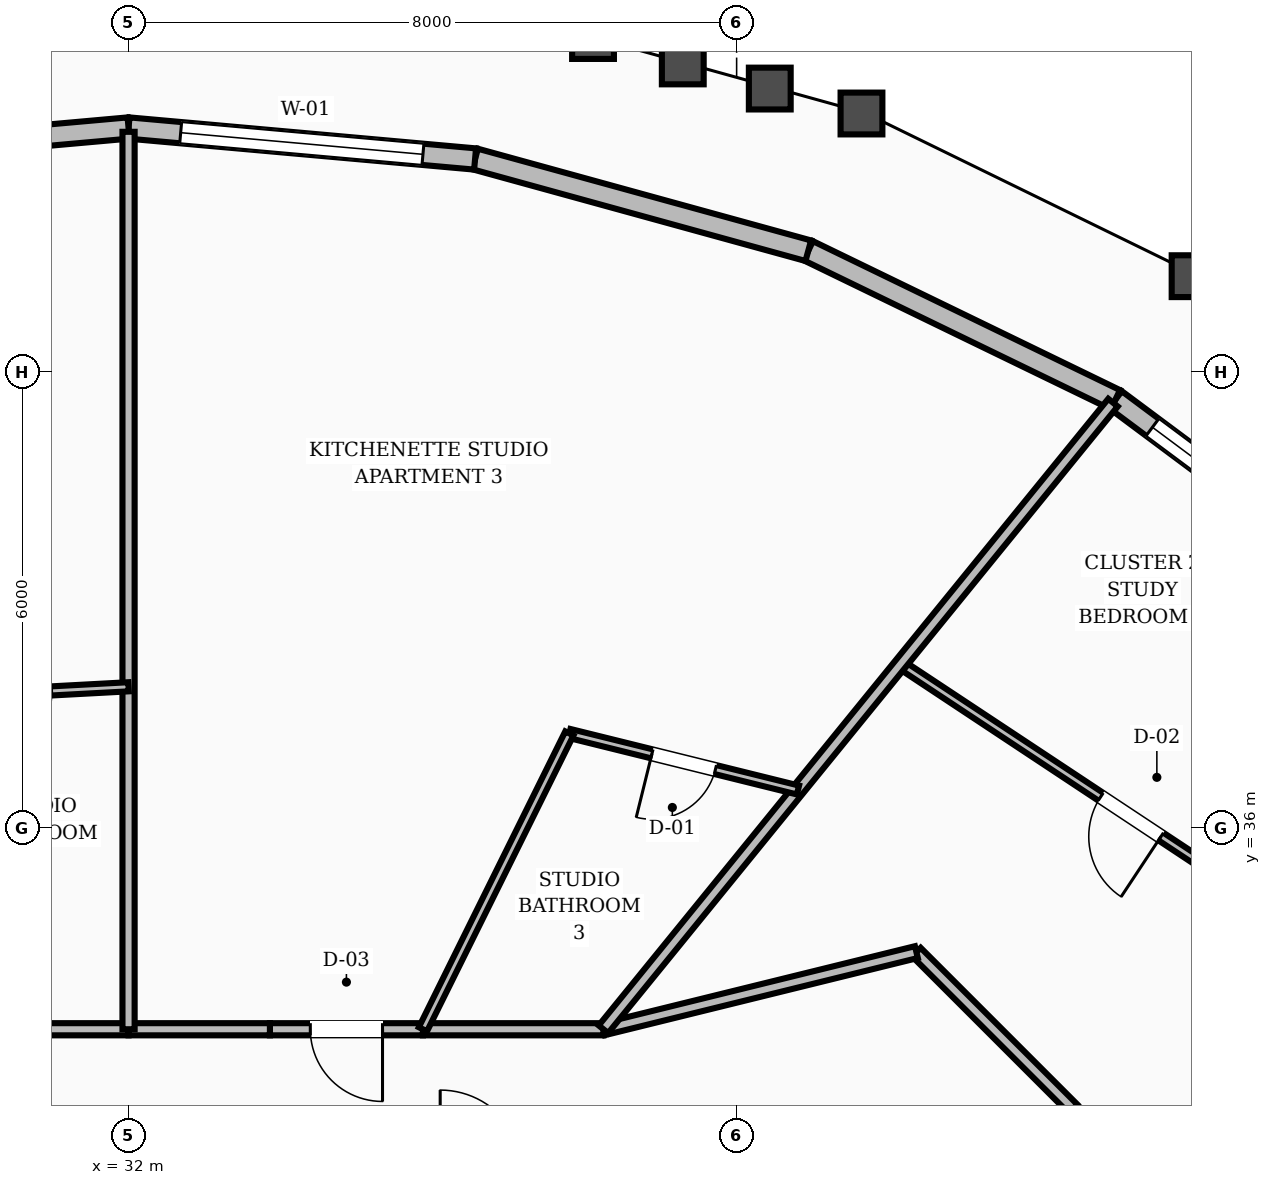
"""IFC4 building model, lengths in metres.
Left out: names, types, materials, properties, quantities, classifications, styles, units other than length and angle.
Written with IfcOpenShell. Run it as: python <this file> out.ifc"""

import sys

from ifc_helpers import new_model, si_unit, direction, frame, frame_2d, origin, place, context, subcontext, project, spatial, rectangle, extrude, element, fill, save


model = new_model("IFC4")
c1 = context("Model", 3, precision=1e-05, world=origin(), true_north=direction((0.0, 1.0)))
c2 = subcontext(c1, "Body", "Model", "MODEL_VIEW")
j1 = project(units=[si_unit("LENGTHUNIT", "METRE"), si_unit("PLANEANGLEUNIT", "RADIAN")], contexts=[c1])
p1 = place(None, origin())
s1 = spatial("IfcSite", under=j1, at=p1, CompositionType="ELEMENT")
p2 = place(p1, origin())
s2 = spatial("IfcBuilding", under=s1, at=p2, CompositionType="ELEMENT")
p3 = place(p2, frame((0.0, 0.0, 218.4)))
s3 = spatial("IfcBuildingStorey", under=s2, at=p3, CompositionType="ELEMENT", Elevation=218.4)
p4 = place(p3, frame((48.524, 38.995, 0.0), z_axis=(0.0, 0.0, 1.0), x_axis=(-0.802005914902, 0.597316090912, 0.0)))
e1 = element("IfcWall", 1, at=p4, inside=s3, PredefinedType="STANDARD", context=c2, shape_type="SweptSolid", body=[
    extrude(rectangle(XDim=4.416, YDim=0.28, at=frame_2d((2.208, 0.0))), origin(), (0.0, 0.0, 1.0), 2.88),
])
p5 = place(p4, frame((0.608, 0.0, 0.8)))
e2 = element("IfcOpeningElement", 2, at=p5, cuts=e1, PredefinedType="OPENING", context=c2, shape_type="SweptSolid", body=[
    extrude(rectangle(XDim=3.2, YDim=1.65, at=frame_2d((1.6, 0.825))), frame((0.0, 0.15, 0.0), z_axis=(0.0, -1.0, 0.0), x_axis=(1.0, 0.0, 0.0)), (0.0, 0.0, 1.0), 0.3),
])
p6 = place(p3, frame((44.983, 41.633, 0.0), z_axis=(0.0, 0.0, 1.0), x_axis=(-0.899755886265, 0.436393566785, 0.0)))
e3 = element("IfcWall", 3, at=p6, inside=s3, PredefinedType="STANDARD", context=c2, shape_type="SweptSolid", body=[
    extrude(rectangle(XDim=4.49, YDim=0.28, at=frame_2d((2.245, 0.0))), origin(), (0.0, 0.0, 1.0), 2.88),
])
p7 = place(p3, frame((40.943, 43.592, 0.0), z_axis=(0.0, 0.0, 1.0), x_axis=(-0.964121606476, 0.265460972511, 0.0)))
e4 = element("IfcWall", 4, at=p7, inside=s3, PredefinedType="STANDARD", context=c2, shape_type="SweptSolid", body=[
    extrude(rectangle(XDim=4.547, YDim=0.28, at=frame_2d((2.273, 0.0))), origin(), (0.0, 0.0, 1.0), 2.88),
])
p8 = place(p3, frame((36.559, 44.799, 0.0), z_axis=(0.0, 0.0, 1.0), x_axis=(-0.996029770712, 0.089020760807, 0.0)))
e5 = element("IfcWall", 5, at=p8, inside=s3, PredefinedType="STANDARD", context=c2, shape_type="SweptSolid", body=[
    extrude(rectangle(XDim=4.577, YDim=0.28, at=frame_2d((2.289, 0.0))), origin(), (0.0, 0.0, 1.0), 2.88),
])
p9 = place(p8, frame((0.689, 0.0, 0.8)))
e6 = element("IfcOpeningElement", 6, at=p9, cuts=e5, PredefinedType="OPENING", context=c2, shape_type="SweptSolid", body=[
    extrude(rectangle(XDim=3.2, YDim=1.65, at=frame_2d((1.6, 0.825))), frame((0.0, 0.15, 0.0), z_axis=(0.0, -1.0, 0.0), x_axis=(1.0, 0.0, 0.0)), (0.0, 0.0, 1.0), 0.3),
])
p10 = place(p3, frame((32.0, 45.207, 0.0), z_axis=(0.0, 0.0, 1.0), x_axis=(-0.996029770712, -0.089020760807, 0.0)))
e7 = element("IfcWall", 7, at=p10, inside=s3, PredefinedType="STANDARD", context=c2, shape_type="SweptSolid", body=[
    extrude(rectangle(XDim=4.577, YDim=0.28, at=frame_2d((2.289, 0.0))), origin(), (0.0, 0.0, 1.0), 2.88),
])
p11 = place(p3, frame((44.427, 32.303, 0.0), z_axis=(0.0, 0.0, 1.0), x_axis=(-0.707106781187, 0.707106781187, 0.0)))
e8 = element("IfcWall", 8, at=p11, inside=s3, PredefinedType="SOLIDWALL", context=c2, shape_type="SweptSolid", body=[
    extrude(rectangle(XDim=2.916, YDim=0.16, at=frame_2d((1.458, 0.0))), origin(), (0.0, 0.0, 1.0), 2.87),
])
p12 = place(p3, frame((42.365, 34.365, 0.0), z_axis=(0.0, 0.0, 1.0), x_axis=(-0.970939799552, -0.239323850978, 0.0)))
e9 = element("IfcWall", 9, at=p12, inside=s3, PredefinedType="SOLIDWALL", context=c2, shape_type="SweptSolid", body=[
    extrude(rectangle(XDim=4.241, YDim=0.16, at=frame_2d((2.12, 0.0))), origin(), (0.0, 0.0, 1.0), 2.87),
])
p13 = place(p3, frame((38.248, 33.35, 0.0), z_axis=(0.0, 0.0, 1.0), x_axis=(-1.0, 0.0, 0.0)))
e10 = element("IfcWall", 10, at=p13, inside=s3, PredefinedType="SOLIDWALL", context=c2, shape_type="SweptSolid", body=[
    extrude(rectangle(XDim=2.375, YDim=0.16, at=frame_2d((1.188, 0.0))), origin(), (0.0, 0.0, 1.0), 2.87),
])
p14 = place(p3, frame((35.873, 33.35, 0.0), z_axis=(0.0, 0.0, 1.0), x_axis=(-1.0, 0.0, 0.0)))
e11 = element("IfcWall", 11, at=p14, inside=s3, PredefinedType="SOLIDWALL", context=c2, shape_type="SweptSolid", body=[
    extrude(rectangle(XDim=2.013, YDim=0.16, at=frame_2d((1.006, 0.0))), origin(), (0.0, 0.0, 1.0), 2.87),
])
p15 = place(p14, frame((0.531, 0.0, 0.0)))
e12 = element("IfcOpeningElement", 12, at=p15, cuts=e11, PredefinedType="OPENING", context=c2, shape_type="SweptSolid", body=[
    extrude(rectangle(XDim=0.95, YDim=2.1, at=frame_2d((0.475, 1.05))), frame((0.0, 0.09, 0.0), z_axis=(0.0, -1.0, 0.0), x_axis=(1.0, 0.0, 0.0)), (0.0, 0.0, 1.0), 0.18),
])
for number, where, z_axis, x_axis in (
    (13, (33.86, 33.35, 0.0), (0.0, 0.0, 1.0), (-1.0, 0.0, 0.0)),
    (14, (32.0, 33.35, 0.0), (0.0, 0.0, 1.0), (-1.0, 0.0, 0.0)),
):
    element("IfcWall", number, at=place(p3, frame(where, z_axis=z_axis, x_axis=x_axis)), inside=s3, PredefinedType="SOLIDWALL", context=c2, shape_type="SweptSolid", body=[
        extrude(rectangle(XDim=1.86, YDim=0.16, at=frame_2d((0.93, 0.0))), origin(), (0.0, 0.0, 1.0), 2.87),
    ])
p16 = place(p3, frame((48.219, 34.14, 0.0), z_axis=(0.0, 0.0, 1.0), x_axis=(-0.833915165303, 0.551892649957, 0.0)))
e15 = element("IfcWall", 15, at=p16, inside=s3, PredefinedType="PARTITIONING", context=c2, shape_type="SweptSolid", body=[
    extrude(rectangle(XDim=7.272, YDim=0.12, at=frame_2d((3.636, 0.0))), origin(), (0.0, 0.0, 1.0), 2.87),
])
p17 = place(p16, frame((3.161, 0.0, 0.0)))
e16 = element("IfcOpeningElement", 16, at=p17, cuts=e15, PredefinedType="OPENING", context=c2, shape_type="SweptSolid", body=[
    extrude(rectangle(XDim=0.95, YDim=2.1, at=frame_2d((0.475, 1.05))), frame((0.0, 0.07, 0.0), z_axis=(0.0, -1.0, 0.0), x_axis=(1.0, 0.0, 0.0)), (0.0, 0.0, 1.0), 0.14),
])
p18 = place(p3, frame((38.248, 33.35, 0.0), z_axis=(0.0, 0.0, 1.0), x_axis=(0.630915216518, 0.775851783246, 0.0)))
e17 = element("IfcWall", 17, at=p18, inside=s3, PredefinedType="SOLIDWALL", context=c2, shape_type="SweptSolid", body=[
    extrude(rectangle(XDim=10.625, YDim=0.16, at=frame_2d((5.313, 0.0))), origin(), (0.0, 0.0, 1.0), 2.87),
])
p19 = place(p3, frame((40.807, 36.497, 0.0), z_axis=(0.0, 0.0, 1.0), x_axis=(-0.970668626589, 0.240421332986, 0.0)))
e18 = element("IfcWall", 18, at=p19, inside=s3, PredefinedType="PARTITIONING", context=c2, shape_type="SweptSolid", body=[
    extrude(rectangle(XDim=3.098, YDim=0.12, at=frame_2d((1.549, 0.0))), origin(), (0.0, 0.0, 1.0), 2.87),
])
p20 = place(p19, frame((1.119, 0.0, 0.0)))
e19 = element("IfcOpeningElement", 19, at=p20, cuts=e18, PredefinedType="OPENING", context=c2, shape_type="SweptSolid", body=[
    extrude(rectangle(XDim=0.86, YDim=2.1, at=frame_2d((0.43, 1.05))), frame((0.0, 0.07, 0.0), z_axis=(0.0, -1.0, 0.0), x_axis=(1.0, 0.0, 0.0)), (0.0, 0.0, 1.0), 0.14),
])
p21 = place(p3, frame((35.873, 33.35, 0.0), z_axis=(0.0, 0.0, 1.0), x_axis=(0.443657211788, 0.896196562384, 0.0)))
e20 = element("IfcWall", 20, at=p21, inside=s3, PredefinedType="PARTITIONING", context=c2, shape_type="SweptSolid", body=[
    extrude(rectangle(XDim=4.343, YDim=0.12, at=frame_2d((2.171, 0.0))), origin(), (0.0, 0.0, 1.0), 2.87),
])
p22 = place(p3, frame((32.0, 33.35, 0.0), z_axis=(0.0, 0.0, 1.0), x_axis=(0.0, 1.0, 0.0)))
e21 = element("IfcWall", 21, at=p22, inside=s3, PredefinedType="SOLIDWALL", context=c2, shape_type="SweptSolid", body=[
    extrude(rectangle(XDim=11.807, YDim=0.16, at=frame_2d((5.903, 0.0))), origin(), (0.0, 0.0, 1.0), 2.87),
])
p23 = place(p3, frame((32.0, 37.855, 0.0), z_axis=(0.0, 0.0, 1.0), x_axis=(-0.998564341908, -0.053565427935, 0.0)))
e22 = element("IfcWall", 22, at=p23, inside=s3, PredefinedType="PARTITIONING", context=c2, shape_type="SweptSolid", body=[
    extrude(rectangle(XDim=2.89, YDim=0.12, at=frame_2d((1.445, 0.0))), origin(), (0.0, 0.0, 1.0), 2.87),
])
p24 = place(p23, frame((1.015, 0.0, 0.0)))
e23 = element("IfcOpeningElement", 23, at=p24, cuts=e22, PredefinedType="OPENING", context=c2, shape_type="SweptSolid", body=[
    extrude(rectangle(XDim=0.86, YDim=2.1, at=frame_2d((0.43, 1.05))), frame((0.0, 0.07, 0.0), z_axis=(0.0, -1.0, 0.0), x_axis=(1.0, 0.0, 0.0)), (0.0, 0.0, 1.0), 0.14),
])
p25 = place(p5, origin())
e24 = element("IfcWindow", 24, at=p25, inside=s3, PartitioningType="SINGLE_PANEL", PredefinedType="WINDOW", context=c2, shape_type="SweptSolid", body=[
    extrude(rectangle(XDim=3.2, YDim=1.65, at=frame_2d((1.6, 0.825))), frame((0.0, 0.03, 0.0), z_axis=(0.0, -1.0, 0.0), x_axis=(1.0, 0.0, 0.0)), (0.0, 0.0, 1.0), 0.06),
])
fill(e2, e24)
p26 = place(p9, origin())
e25 = element("IfcWindow", 25, at=p26, inside=s3, PartitioningType="SINGLE_PANEL", PredefinedType="WINDOW", context=c2, shape_type="SweptSolid", body=[
    extrude(rectangle(XDim=3.2, YDim=1.65, at=frame_2d((1.6, 0.825))), frame((0.0, 0.03, 0.0), z_axis=(0.0, -1.0, 0.0), x_axis=(1.0, 0.0, 0.0)), (0.0, 0.0, 1.0), 0.06),
])
fill(e6, e25)
p27 = place(p17, origin())
e26 = element("IfcDoor", 26, at=p27, inside=s3, OperationType="SINGLE_SWING_LEFT", PredefinedType="DOOR", context=c2, shape_type="SweptSolid", body=[
    extrude(rectangle(XDim=0.95, YDim=2.1, at=frame_2d((0.475, 1.05))), frame((0.0, 0.025, 0.0), z_axis=(0.0, -1.0, 0.0), x_axis=(1.0, 0.0, 0.0)), (0.0, 0.0, 1.0), 0.05),
])
fill(e16, e26)
p28 = place(p20, origin())
e27 = element("IfcDoor", 27, at=p28, inside=s3, OperationType="SINGLE_SWING_RIGHT", PredefinedType="DOOR", context=c2, shape_type="SweptSolid", body=[
    extrude(rectangle(XDim=0.86, YDim=2.1, at=frame_2d((0.43, 1.05))), frame((0.0, 0.025, 0.0), z_axis=(0.0, -1.0, 0.0), x_axis=(1.0, 0.0, 0.0)), (0.0, 0.0, 1.0), 0.05),
])
fill(e19, e27)
p29 = place(p15, origin())
e28 = element("IfcDoor", 28, at=p29, inside=s3, OperationType="SINGLE_SWING_LEFT", PredefinedType="DOOR", context=c2, shape_type="SweptSolid", body=[
    extrude(rectangle(XDim=0.95, YDim=2.1, at=frame_2d((0.475, 1.05))), frame((0.0, 0.025, 0.0), z_axis=(0.0, -1.0, 0.0), x_axis=(1.0, 0.0, 0.0)), (0.0, 0.0, 1.0), 0.05),
])
fill(e12, e28)
save(model, sys.argv[1])
